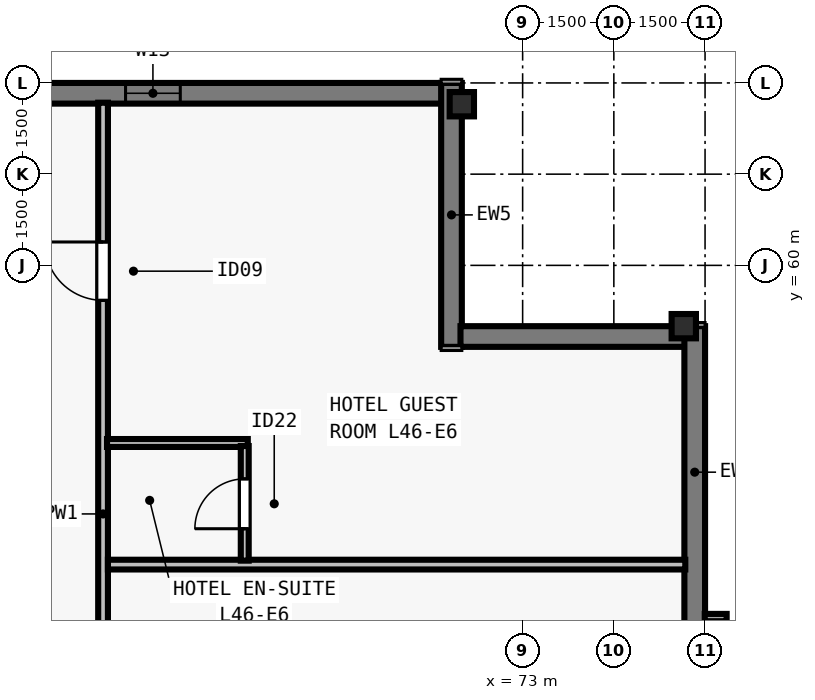
"""IFC4 building model, lengths in metres.
Left out: names, types, materials, properties, quantities, classifications, styles, units other than length and angle.
Written with IfcOpenShell. Run it as: python <this file> out.ifc"""

import sys

from ifc_helpers import new_model, si_unit, direction, frame, frame_2d, origin, origin_2d, place, context, subcontext, project, spatial, rectangle, i_section, extrude, element, fill, save


model = new_model("IFC4")
c1 = context("Model", 3, precision=1e-05, world=origin(), true_north=direction((0.0, 1.0)))
c2 = subcontext(c1, "Body", "Model", "MODEL_VIEW")
j1 = project(units=[si_unit("LENGTHUNIT", "METRE"), si_unit("PLANEANGLEUNIT", "RADIAN")], contexts=[c1])
p1 = place(None, origin())
s1 = spatial("IfcSite", under=j1, at=p1, CompositionType="ELEMENT")
p2 = place(p1, origin())
s2 = spatial("IfcBuilding", under=s1, at=p2, CompositionType="ELEMENT")
p3 = place(p2, frame((0.0, 0.0, 169.0)))
s3 = spatial("IfcBuildingStorey", under=s2, at=p3, CompositionType="ELEMENT", Elevation=169.0)
for number, where, z_axis, x_axis in (
    (1, (75.65, 59.0, 0.0), (0.0, 0.0, 1.0), (0.0, 1.0, 0.0)),
    (2, (72.0, 62.65, 0.0), (0.0, 0.0, 1.0), (1.0, 0.0, 0.0)),
):
    element("IfcColumn", number, at=place(p3, frame(where, z_axis=z_axis, x_axis=x_axis)), inside=s3, PredefinedType="COLUMN", context=c2, shape_type="SweptSolid", body=[
        extrude(i_section(OverallWidth=0.4, OverallDepth=0.4, WebThickness=0.022, FlangeThickness=0.036, at=origin_2d()), origin(), (0.0, 0.0, 1.0), 3.5),
    ])
p4 = place(p3, frame((32.0, 62.83, 0.0), z_axis=(0.0, 0.0, 1.0), x_axis=(1.0, 0.0, 0.0)))
e3 = element("IfcWall", 3, at=p4, inside=s3, PredefinedType="SOLIDWALL", context=c2, shape_type="SweptSolid", body=[
    extrude(rectangle(XDim=39.682, YDim=0.34, at=frame_2d((19.841, 0.0))), origin(), (0.0, 0.0, 1.0), 3.28),
])
p5 = place(p4, frame((4.952, 0.0, 0.8)))
e4 = element("IfcOpeningElement", 4, at=p5, cuts=e3, PredefinedType="OPENING", context=c2, shape_type="SweptSolid", body=[
    extrude(rectangle(XDim=1.35, YDim=1.66, at=frame_2d((0.675, 0.83))), frame((0.0, 0.18, 0.0), z_axis=(0.0, -1.0, 0.0), x_axis=(1.0, 0.0, 0.0)), (0.0, 0.0, 1.0), 0.36),
])
p6 = place(p4, frame((12.059, 0.0, 0.8)))
e5 = element("IfcOpeningElement", 5, at=p6, cuts=e3, PredefinedType="OPENING", context=c2, shape_type="SweptSolid", body=[
    extrude(rectangle(XDim=1.35, YDim=1.66, at=frame_2d((0.675, 0.83))), frame((0.0, 0.18, 0.0), z_axis=(0.0, -1.0, 0.0), x_axis=(1.0, 0.0, 0.0)), (0.0, 0.0, 1.0), 0.36),
])
p7 = place(p4, frame((19.166, 0.0, 0.8)))
e6 = element("IfcOpeningElement", 6, at=p7, cuts=e3, PredefinedType="OPENING", context=c2, shape_type="SweptSolid", body=[
    extrude(rectangle(XDim=1.35, YDim=1.66, at=frame_2d((0.675, 0.83))), frame((0.0, 0.18, 0.0), z_axis=(0.0, -1.0, 0.0), x_axis=(1.0, 0.0, 0.0)), (0.0, 0.0, 1.0), 0.36),
])
p8 = place(p4, frame((21.27, 0.0, 0.8)))
e7 = element("IfcOpeningElement", 7, at=p8, cuts=e3, PredefinedType="OPENING", context=c2, shape_type="SweptSolid", body=[
    extrude(rectangle(XDim=1.75, YDim=1.66, at=frame_2d((0.875, 0.83))), frame((0.0, 0.18, 0.0), z_axis=(0.0, -1.0, 0.0), x_axis=(1.0, 0.0, 0.0)), (0.0, 0.0, 1.0), 0.36),
])
p9 = place(p4, frame((26.273, 0.0, 0.8)))
e8 = element("IfcOpeningElement", 8, at=p9, cuts=e3, PredefinedType="OPENING", context=c2, shape_type="SweptSolid", body=[
    extrude(rectangle(XDim=1.35, YDim=1.66, at=frame_2d((0.675, 0.83))), frame((0.0, 0.18, 0.0), z_axis=(0.0, -1.0, 0.0), x_axis=(1.0, 0.0, 0.0)), (0.0, 0.0, 1.0), 0.36),
])
p10 = place(p4, frame((29.627, 0.0, 0.8)))
e9 = element("IfcOpeningElement", 9, at=p10, cuts=e3, PredefinedType="OPENING", context=c2, shape_type="SweptSolid", body=[
    extrude(rectangle(XDim=1.75, YDim=1.66, at=frame_2d((0.875, 0.83))), frame((0.0, 0.18, 0.0), z_axis=(0.0, -1.0, 0.0), x_axis=(1.0, 0.0, 0.0)), (0.0, 0.0, 1.0), 0.36),
])
p11 = place(p4, frame((34.47, 0.0, 0.8)))
e10 = element("IfcOpeningElement", 10, at=p11, cuts=e3, PredefinedType="OPENING", context=c2, shape_type="SweptSolid", body=[
    extrude(rectangle(XDim=0.9, YDim=1.66, at=frame_2d((0.45, 0.83))), frame((0.0, 0.18, 0.0), z_axis=(0.0, -1.0, 0.0), x_axis=(1.0, 0.0, 0.0)), (0.0, 0.0, 1.0), 0.36),
])
p12 = place(p3, frame((71.83, 63.0, 0.0), z_axis=(0.0, 0.0, 1.0), x_axis=(0.0, -1.0, 0.0)))
e11 = element("IfcWall", 11, at=p12, inside=s3, PredefinedType="SOLIDWALL", context=c2, shape_type="SweptSolid", body=[
    extrude(rectangle(XDim=4.34, YDim=0.34, at=frame_2d((2.17, 0.0))), origin(), (0.0, 0.0, 1.0), 3.28),
])
p13 = place(p3, frame((71.978, 58.83, 0.0), z_axis=(0.0, 0.0, 1.0), x_axis=(1.0, 0.0, 0.0)))
e12 = element("IfcWall", 12, at=p13, inside=s3, PredefinedType="SOLIDWALL", context=c2, shape_type="SweptSolid", body=[
    extrude(rectangle(XDim=3.704, YDim=0.34, at=frame_2d((1.852, 0.0))), origin(), (0.0, 0.0, 1.0), 3.28),
])
p14 = place(p3, frame((75.83, 59.0, 0.0), z_axis=(0.0, 0.0, 1.0), x_axis=(0.0, -1.0, 0.0)))
e13 = element("IfcWall", 13, at=p14, inside=s3, PredefinedType="SOLIDWALL", context=c2, shape_type="SweptSolid", body=[
    extrude(rectangle(XDim=39.682, YDim=0.34, at=frame_2d((19.841, 0.0))), origin(), (0.0, 0.0, 1.0), 3.28),
])
p15 = place(p14, frame((4.952, 0.0, 0.8)))
e14 = element("IfcOpeningElement", 14, at=p15, cuts=e13, PredefinedType="OPENING", context=c2, shape_type="SweptSolid", body=[
    extrude(rectangle(XDim=1.35, YDim=1.66, at=frame_2d((0.675, 0.83))), frame((0.0, 0.18, 0.0), z_axis=(0.0, -1.0, 0.0), x_axis=(1.0, 0.0, 0.0)), (0.0, 0.0, 1.0), 0.36),
])
p16 = place(p14, frame((8.305, 0.0, 0.8)))
e15 = element("IfcOpeningElement", 15, at=p16, cuts=e13, PredefinedType="OPENING", context=c2, shape_type="SweptSolid", body=[
    extrude(rectangle(XDim=1.75, YDim=1.66, at=frame_2d((0.875, 0.83))), frame((0.0, 0.18, 0.0), z_axis=(0.0, -1.0, 0.0), x_axis=(1.0, 0.0, 0.0)), (0.0, 0.0, 1.0), 0.36),
])
p17 = place(p14, frame((12.909, 0.0, 0.8)))
e16 = element("IfcOpeningElement", 16, at=p17, cuts=e13, PredefinedType="OPENING", context=c2, shape_type="SweptSolid", body=[
    extrude(rectangle(XDim=1.35, YDim=1.66, at=frame_2d((0.675, 0.83))), frame((0.0, 0.18, 0.0), z_axis=(0.0, -1.0, 0.0), x_axis=(1.0, 0.0, 0.0)), (0.0, 0.0, 1.0), 0.36),
])
p18 = place(p14, frame((16.262, 0.0, 0.8)))
e17 = element("IfcOpeningElement", 17, at=p18, cuts=e13, PredefinedType="OPENING", context=c2, shape_type="SweptSolid", body=[
    extrude(rectangle(XDim=1.75, YDim=1.66, at=frame_2d((0.875, 0.83))), frame((0.0, 0.18, 0.0), z_axis=(0.0, -1.0, 0.0), x_axis=(1.0, 0.0, 0.0)), (0.0, 0.0, 1.0), 0.36),
])
p19 = place(p14, frame((20.016, 0.0, 0.8)))
e18 = element("IfcOpeningElement", 18, at=p19, cuts=e13, PredefinedType="OPENING", context=c2, shape_type="SweptSolid", body=[
    extrude(rectangle(XDim=1.35, YDim=1.66, at=frame_2d((0.675, 0.83))), frame((0.0, 0.18, 0.0), z_axis=(0.0, -1.0, 0.0), x_axis=(1.0, 0.0, 0.0)), (0.0, 0.0, 1.0), 0.36),
])
p20 = place(p14, frame((22.07, 0.0, 0.8)))
e19 = element("IfcOpeningElement", 19, at=p20, cuts=e13, PredefinedType="OPENING", context=c2, shape_type="SweptSolid", body=[
    extrude(rectangle(XDim=1.75, YDim=1.66, at=frame_2d((0.875, 0.83))), frame((0.0, 0.18, 0.0), z_axis=(0.0, -1.0, 0.0), x_axis=(1.0, 0.0, 0.0)), (0.0, 0.0, 1.0), 0.36),
])
p21 = place(p14, frame((26.273, 0.0, 0.8)))
e20 = element("IfcOpeningElement", 20, at=p21, cuts=e13, PredefinedType="OPENING", context=c2, shape_type="SweptSolid", body=[
    extrude(rectangle(XDim=1.35, YDim=1.66, at=frame_2d((0.675, 0.83))), frame((0.0, 0.18, 0.0), z_axis=(0.0, -1.0, 0.0), x_axis=(1.0, 0.0, 0.0)), (0.0, 0.0, 1.0), 0.36),
])
p22 = place(p14, frame((29.627, 0.0, 0.8)))
e21 = element("IfcOpeningElement", 21, at=p22, cuts=e13, PredefinedType="OPENING", context=c2, shape_type="SweptSolid", body=[
    extrude(rectangle(XDim=1.75, YDim=1.66, at=frame_2d((0.875, 0.83))), frame((0.0, 0.18, 0.0), z_axis=(0.0, -1.0, 0.0), x_axis=(1.0, 0.0, 0.0)), (0.0, 0.0, 1.0), 0.36),
])
p23 = place(p14, frame((33.38, 0.0, 0.8)))
e22 = element("IfcOpeningElement", 22, at=p23, cuts=e13, PredefinedType="OPENING", context=c2, shape_type="SweptSolid", body=[
    extrude(rectangle(XDim=1.35, YDim=1.66, at=frame_2d((0.675, 0.83))), frame((0.0, 0.18, 0.0), z_axis=(0.0, -1.0, 0.0), x_axis=(1.0, 0.0, 0.0)), (0.0, 0.0, 1.0), 0.36),
])
p24 = place(p14, frame((35.75, 0.0, 0.8)))
e23 = element("IfcOpeningElement", 23, at=p24, cuts=e13, PredefinedType="OPENING", context=c2, shape_type="SweptSolid", body=[
    extrude(rectangle(XDim=0.9, YDim=1.66, at=frame_2d((0.45, 0.83))), frame((0.0, 0.18, 0.0), z_axis=(0.0, -1.0, 0.0), x_axis=(1.0, 0.0, 0.0)), (0.0, 0.0, 1.0), 0.36),
])
p25 = place(p3, frame((66.1, 15.325, 0.0), z_axis=(0.0, 0.0, 1.0), x_axis=(0.0, 1.0, 0.0)))
e24 = element("IfcWall", 24, at=p25, inside=s3, PredefinedType="PARTITIONING", context=c2, shape_type="SweptSolid", body=[
    extrude(rectangle(XDim=47.35, YDim=0.16, at=frame_2d((23.675, 0.0))), origin(), (0.0, 0.0, 1.0), 2.555),
])
p26 = place(p25, frame((5.025, 0.0, 0.0)))
e25 = element("IfcOpeningElement", 25, at=p26, cuts=e24, PredefinedType="OPENING", context=c2, shape_type="SweptSolid", body=[
    extrude(rectangle(XDim=0.96, YDim=2.15, at=frame_2d((0.48, 1.075))), frame((0.0, 0.09, 0.0), z_axis=(0.0, -1.0, 0.0), x_axis=(1.0, 0.0, 0.0)), (0.0, 0.0, 1.0), 0.18),
])
p27 = place(p25, frame((12.535, 0.0, 0.0)))
e26 = element("IfcOpeningElement", 26, at=p27, cuts=e24, PredefinedType="OPENING", context=c2, shape_type="SweptSolid", body=[
    extrude(rectangle(XDim=0.96, YDim=2.15, at=frame_2d((0.48, 1.075))), frame((0.0, 0.09, 0.0), z_axis=(0.0, -1.0, 0.0), x_axis=(1.0, 0.0, 0.0)), (0.0, 0.0, 1.0), 0.18),
])
p28 = place(p25, frame((20.395, 0.0, 0.0)))
e27 = element("IfcOpeningElement", 27, at=p28, cuts=e24, PredefinedType="OPENING", context=c2, shape_type="SweptSolid", body=[
    extrude(rectangle(XDim=0.96, YDim=2.15, at=frame_2d((0.48, 1.075))), frame((0.0, 0.09, 0.0), z_axis=(0.0, -1.0, 0.0), x_axis=(1.0, 0.0, 0.0)), (0.0, 0.0, 1.0), 0.18),
])
p29 = place(p25, frame((28.255, 0.0, 0.0)))
e28 = element("IfcOpeningElement", 28, at=p29, cuts=e24, PredefinedType="OPENING", context=c2, shape_type="SweptSolid", body=[
    extrude(rectangle(XDim=0.96, YDim=2.15, at=frame_2d((0.48, 1.075))), frame((0.0, 0.09, 0.0), z_axis=(0.0, -1.0, 0.0), x_axis=(1.0, 0.0, 0.0)), (0.0, 0.0, 1.0), 0.18),
])
p30 = place(p25, frame((36.115, 0.0, 0.0)))
e29 = element("IfcOpeningElement", 29, at=p30, cuts=e24, PredefinedType="OPENING", context=c2, shape_type="SweptSolid", body=[
    extrude(rectangle(XDim=0.96, YDim=2.15, at=frame_2d((0.48, 1.075))), frame((0.0, 0.09, 0.0), z_axis=(0.0, -1.0, 0.0), x_axis=(1.0, 0.0, 0.0)), (0.0, 0.0, 1.0), 0.18),
])
p31 = place(p25, frame((44.1, 0.0, 0.0)))
e30 = element("IfcOpeningElement", 30, at=p31, cuts=e24, PredefinedType="OPENING", context=c2, shape_type="SweptSolid", body=[
    extrude(rectangle(XDim=0.96, YDim=2.15, at=frame_2d((0.48, 1.075))), frame((0.0, 0.09, 0.0), z_axis=(0.0, -1.0, 0.0), x_axis=(1.0, 0.0, 0.0)), (0.0, 0.0, 1.0), 0.18),
])
p32 = place(p3, frame((66.18, 55.079, 0.0), z_axis=(0.0, 0.0, 1.0), x_axis=(1.0, 0.0, 0.0)))
e31 = element("IfcWall", 31, at=p32, inside=s3, PredefinedType="PARTITIONING", context=c2, shape_type="SweptSolid", body=[
    extrude(rectangle(XDim=9.495, YDim=0.16, at=frame_2d((4.748, 0.0))), origin(), (0.0, 0.0, 1.0), 2.896),
])
p33 = place(p3, frame((66.165, 57.079, 0.0), z_axis=(0.0, 0.0, 1.0), x_axis=(1.0, 0.0, 0.0)))
e32 = element("IfcWall", 32, at=p33, inside=s3, PredefinedType="PLUMBINGWALL", context=c2, shape_type="SweptSolid", body=[
    extrude(rectangle(XDim=2.315, YDim=0.13, at=frame_2d((1.157, 0.0))), origin(), (0.0, 0.0, 1.0), 3.28),
])
p34 = place(p3, frame((68.43, 55.144, 0.0), z_axis=(0.0, 0.0, 1.0), x_axis=(0.0, 1.0, 0.0)))
e33 = element("IfcWall", 33, at=p34, inside=s3, PredefinedType="PLUMBINGWALL", context=c2, shape_type="SweptSolid", body=[
    extrude(rectangle(XDim=1.885, YDim=0.13, at=frame_2d((0.942, 0.0))), origin(), (0.0, 0.0, 1.0), 3.28),
])
p35 = place(p34, frame((0.525, 0.0, 0.0)))
e34 = element("IfcOpeningElement", 34, at=p35, cuts=e33, PredefinedType="OPENING", context=c2, shape_type="SweptSolid", body=[
    extrude(rectangle(XDim=0.82, YDim=2.1, at=frame_2d((0.41, 1.05))), frame((0.0, 0.075, 0.0), z_axis=(0.0, -1.0, 0.0), x_axis=(1.0, 0.0, 0.0)), (0.0, 0.0, 1.0), 0.15),
])
p36 = place(p11, origin())
e35 = element("IfcWindow", 35, at=p36, inside=s3, PartitioningType="SINGLE_PANEL", PredefinedType="WINDOW", context=c2, shape_type="SweptSolid", body=[
    extrude(rectangle(XDim=0.9, YDim=1.66, at=frame_2d((0.45, 0.83))), frame((0.0, -0.04, 0.0), z_axis=(0.0, -1.0, 0.0), x_axis=(1.0, 0.0, 0.0)), (0.0, 0.0, 1.0), 0.06),
])
fill(e10, e35)
p37 = place(p35, origin())
e36 = element("IfcDoor", 36, at=p37, inside=s3, OperationType="SINGLE_SWING_LEFT", PredefinedType="DOOR", context=c2, shape_type="SweptSolid", body=[
    extrude(rectangle(XDim=0.82, YDim=2.1, at=frame_2d((0.41, 1.05))), frame((0.0, 0.025, 0.0), z_axis=(0.0, -1.0, 0.0), x_axis=(1.0, 0.0, 0.0)), (0.0, 0.0, 1.0), 0.05),
])
fill(e34, e36)
p38 = place(p31, origin())
e37 = element("IfcDoor", 37, at=p38, inside=s3, OperationType="SINGLE_SWING_RIGHT", PredefinedType="DOOR", context=c2, shape_type="SweptSolid", body=[
    extrude(rectangle(XDim=0.96, YDim=2.15, at=frame_2d((0.48, 1.075))), frame((0.0, 0.025, 0.0), z_axis=(0.0, -1.0, 0.0), x_axis=(1.0, 0.0, 0.0)), (0.0, 0.0, 1.0), 0.05),
])
fill(e30, e37)
save(model, sys.argv[1])
